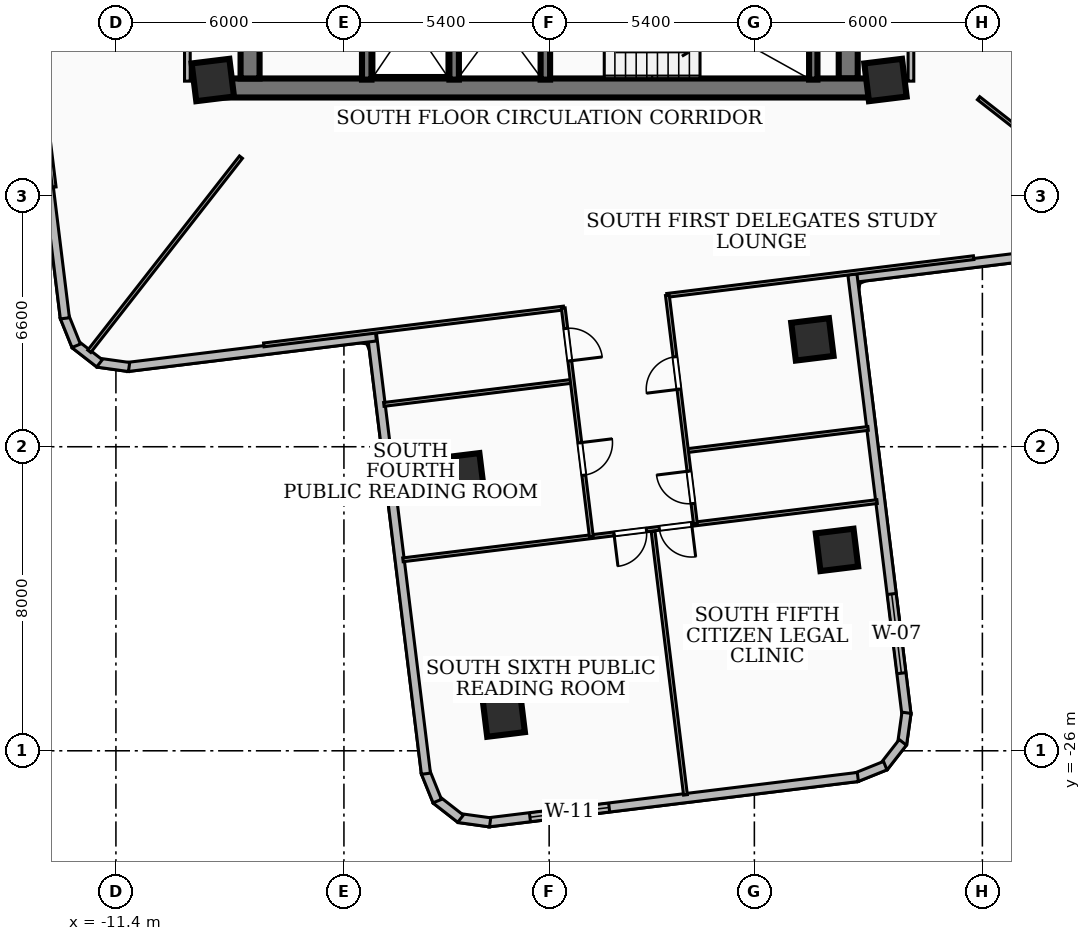
"""IFC4 building model, lengths in metres.
Left out: names, types, materials, properties, quantities, classifications, styles, units other than length and angle.
Written with IfcOpenShell. Run it as: python <this file> out.ifc"""

import sys

from ifc_helpers import new_model, si_unit, direction, frame, frame_2d, origin, origin_2d, place, context, subcontext, project, spatial, rectangle, extrude, element, fill, save


model = new_model("IFC4")
c1 = context("Model", 3, precision=1e-05, world=origin(), true_north=direction((0.0, 1.0)))
c2 = subcontext(c1, "Body", "Model", "MODEL_VIEW")
j1 = project(units=[si_unit("LENGTHUNIT", "METRE"), si_unit("PLANEANGLEUNIT", "RADIAN")], contexts=[c1])
p1 = place(None, origin())
s1 = spatial("IfcSite", under=j1, at=p1, CompositionType="ELEMENT")
p2 = place(p1, origin())
s2 = spatial("IfcBuilding", under=s1, at=p2, CompositionType="ELEMENT")
p3 = place(p2, frame((0.0, 0.0, 82.08)))
s3 = spatial("IfcBuildingStorey", under=s2, at=p3, CompositionType="ELEMENT", Elevation=82.08)
p4 = place(p3, frame((8.78, -8.56, 0.0), z_axis=(0.0, 0.0, 1.0), x_axis=(-1.0, 0.0, 0.0)))
e1 = element("IfcWall", 1, at=p4, inside=s3, PredefinedType="SHEAR", context=c2, shape_type="SweptSolid", body=[
    extrude(rectangle(XDim=17.56, YDim=0.5, at=frame_2d((8.78, 0.0))), origin(), (0.0, 0.0, 1.0), 3.34),
])
for number, where, z_axis, x_axis in (
    (2, (-7.87, -8.31, 0.0), (0.0, 0.0, 1.0), (0.0, 1.0, 0.0)),
    (3, (7.87, -2.0, 0.0), (0.0, 0.0, 1.0), (0.0, -1.0, 0.0)),
):
    element("IfcWall", number, at=place(p3, frame(where, z_axis=z_axis, x_axis=x_axis)), inside=s3, PredefinedType="SHEAR", context=c2, shape_type="SweptSolid", body=[
        extrude(rectangle(XDim=6.31, YDim=0.5, at=frame_2d((3.155, 0.0))), origin(), (0.0, 0.0, 1.0), 3.34),
    ])
p5 = place(p3, frame((6.95, -8.34, 0.0), z_axis=(0.0, 0.0, 1.0), x_axis=(0.0, 1.0, 0.0)))
e4 = element("IfcWall", 4, at=p5, inside=s3, PredefinedType="SOLIDWALL", context=c2, shape_type="SweptSolid", body=[
    extrude(rectangle(XDim=3.06, YDim=0.22, at=frame_2d((1.53, 0.0))), origin(), (0.0, 0.0, 1.0), 3.34),
])
for number, where, z_axis, x_axis in (
    (5, (-0.1, -8.34, 0.0), (0.0, 0.0, 1.0), (0.0, 1.0, 0.0)),
    (6, (-2.5, -8.34, 0.0), (0.0, 0.0, 1.0), (0.0, 1.0, 0.0)),
    (7, (-4.8, -8.34, 0.0), (0.0, 0.0, 1.0), (0.0, 1.0, 0.0)),
):
    element("IfcWall", number, at=place(p3, frame(where, z_axis=z_axis, x_axis=x_axis)), inside=s3, PredefinedType="SOLIDWALL", context=c2, shape_type="SweptSolid", body=[
        extrude(rectangle(XDim=3.04, YDim=0.25, at=frame_2d((1.52, 0.0))), origin(), (0.0, 0.0, 1.0), 3.34),
    ])
for number, where, z_axis, x_axis in (
    (8, (8.85, -8.35, 0.0), (0.0, 0.0, 1.0), (0.993, 0.122, 0.0)),
    (9, (-8.85, -8.35, 0.0), (0.0, 0.0, 1.0), (0.993, 0.122, 0.0)),
    (10, (-2.271, -18.724, 0.0), (0.0, 0.0, 1.0), (0.993, 0.122, 0.0)),
    (11, (6.927, -15.175, 0.0), (0.0, 0.0, 1.0), (0.993, 0.122, 0.0)),
    (12, (-1.195, -25.074, 0.0), (0.0, 0.0, 1.0), (0.993, 0.122, 0.0)),
    (13, (7.574, -20.714, 0.0), (0.0, 0.0, 1.0), (0.993, 0.122, 0.0)),
):
    element("IfcColumn", number, at=place(p3, frame(where, z_axis=z_axis, x_axis=x_axis)), inside=s3, PredefinedType="COLUMN", context=c2, shape_type="SweptSolid", body=[
        extrude(rectangle(XDim=1.0, YDim=1.0, at=origin_2d()), origin(), (0.0, 0.0, 1.0), 3.6),
    ])
p6 = place(p3, frame((14.621, -12.743, 0.0), z_axis=(0.0, 0.0, 1.0), x_axis=(-0.992536263595, -0.121949848087, 0.0)))
e14 = element("IfcWall", 14, at=p6, inside=s3, PredefinedType="SOLIDWALL", context=c2, shape_type="SweptSolid", body=[
    extrude(rectangle(XDim=6.775, YDim=0.24, at=frame_2d((3.387, 0.0))), origin(), (0.0, 0.0, 1.0), 3.34),
])
p7 = place(p3, frame((7.98, -13.462, 0.0), z_axis=(0.0, 0.0, 1.0), x_axis=(0.121890578705, -0.992543544044, 0.0)))
e15 = element("IfcWall", 15, at=p7, inside=s3, PredefinedType="SOLIDWALL", context=c2, shape_type="SweptSolid", body=[
    extrude(rectangle(XDim=11.675, YDim=0.24, at=frame_2d((5.838, 0.0))), origin(), (0.0, 0.0, 1.0), 3.34),
])
p8 = place(p7, frame((8.475, 0.0, 0.85)))
e16 = element("IfcOpeningElement", 16, at=p8, cuts=e15, PredefinedType="OPENING", context=c2, shape_type="SweptSolid", body=[
    extrude(rectangle(XDim=2.1, YDim=1.8, at=frame_2d((1.05, 0.9))), frame((0.0, 0.13, 0.0), z_axis=(0.0, -1.0, 0.0), x_axis=(1.0, 0.0, 0.0)), (0.0, 0.0, 1.0), 0.26),
])
p9 = place(p3, frame((9.403, -25.0, 0.0), z_axis=(0.0, 0.0, 1.0), x_axis=(-0.138376981782, -0.990379629694, 0.0)))
e17 = element("IfcWall", 17, at=p9, inside=s3, PredefinedType="SOLIDWALL", context=c2, shape_type="SweptSolid", body=[
    extrude(rectangle(XDim=0.831, YDim=0.24, at=frame_2d((0.416, 0.0))), origin(), (0.0, 0.0, 1.0), 3.34),
])
p10 = place(p3, frame((9.306, -25.778, 0.0), z_axis=(0.0, 0.0, 1.0), x_axis=(-0.614542882467, -0.788883416995, 0.0)))
e18 = element("IfcWall", 18, at=p10, inside=s3, PredefinedType="SOLIDWALL", context=c2, shape_type="SweptSolid", body=[
    extrude(rectangle(XDim=0.814, YDim=0.24, at=frame_2d((0.407, 0.0))), origin(), (0.0, 0.0, 1.0), 3.34),
])
p11 = place(p3, frame((8.844, -26.391, 0.0), z_axis=(0.0, 0.0, 1.0), x_axis=(-0.92756002783, -0.37367418264, 0.0)))
e19 = element("IfcWall", 19, at=p11, inside=s3, PredefinedType="SOLIDWALL", context=c2, shape_type="SweptSolid", body=[
    extrude(rectangle(XDim=0.829, YDim=0.24, at=frame_2d((0.415, 0.0))), origin(), (0.0, 0.0, 1.0), 3.34),
])
p12 = place(p3, frame((8.123, -26.689, 0.0), z_axis=(0.0, 0.0, 1.0), x_axis=(-0.992547632308, -0.12185728374, 0.0)))
e20 = element("IfcWall", 20, at=p12, inside=s3, PredefinedType="SOLIDWALL", context=c2, shape_type="SweptSolid", body=[
    extrude(rectangle(XDim=9.799, YDim=0.24, at=frame_2d((4.899, 0.0))), origin(), (0.0, 0.0, 1.0), 3.34),
])
p13 = place(p12, frame((6.593, 0.0, 0.85)))
e21 = element("IfcOpeningElement", 21, at=p13, cuts=e20, PredefinedType="OPENING", context=c2, shape_type="SweptSolid", body=[
    extrude(rectangle(XDim=2.1, YDim=1.6, at=frame_2d((1.05, 0.8))), frame((0.0, 0.13, 0.0), z_axis=(0.0, -1.0, 0.0), x_axis=(1.0, 0.0, 0.0)), (0.0, 0.0, 1.0), 0.26),
])
p14 = place(p3, frame((-1.553, -27.883, 0.0), z_axis=(0.0, 0.0, 1.0), x_axis=(-0.990540037659, 0.137224027762, 0.0)))
e22 = element("IfcWall", 22, at=p14, inside=s3, PredefinedType="SOLIDWALL", context=c2, shape_type="SweptSolid", body=[
    extrude(rectangle(XDim=0.831, YDim=0.24, at=frame_2d((0.416, 0.0))), origin(), (0.0, 0.0, 1.0), 3.34),
])
p15 = place(p3, frame((-2.331, -27.787, 0.0), z_axis=(0.0, 0.0, 1.0), x_axis=(-0.788156162836, 0.615475314683, 0.0)))
e23 = element("IfcWall", 23, at=p15, inside=s3, PredefinedType="SOLIDWALL", context=c2, shape_type="SweptSolid", body=[
    extrude(rectangle(XDim=0.814, YDim=0.24, at=frame_2d((0.407, 0.0))), origin(), (0.0, 0.0, 1.0), 3.34),
])
p16 = place(p3, frame((-2.944, -27.324, 0.0), z_axis=(0.0, 0.0, 1.0), x_axis=(-0.37367418264, 0.92756002783, 0.0)))
e24 = element("IfcWall", 24, at=p16, inside=s3, PredefinedType="SOLIDWALL", context=c2, shape_type="SweptSolid", body=[
    extrude(rectangle(XDim=0.829, YDim=0.24, at=frame_2d((0.415, 0.0))), origin(), (0.0, 0.0, 1.0), 3.34),
])
p17 = place(p3, frame((-3.242, -26.603, 0.0), z_axis=(0.0, 0.0, 1.0), x_axis=(-0.121890578705, 0.992543544044, 0.0)))
e25 = element("IfcWall", 25, at=p17, inside=s3, PredefinedType="SOLIDWALL", context=c2, shape_type="SweptSolid", body=[
    extrude(rectangle(XDim=11.675, YDim=0.24, at=frame_2d((5.838, 0.0))), origin(), (0.0, 0.0, 1.0), 2.486),
])
p18 = place(p3, frame((-4.558, -15.098, 0.0), z_axis=(0.0, 0.0, 1.0), x_axis=(-0.992537639855, -0.121938646341, 0.0)))
e26 = element("IfcWall", 26, at=p18, inside=s3, PredefinedType="SOLIDWALL", context=c2, shape_type="SweptSolid", body=[
    extrude(rectangle(XDim=6.595, YDim=0.24, at=frame_2d((3.298, 0.0))), origin(), (0.0, 0.0, 1.0), 2.486),
])
p19 = place(p3, frame((-11.054, -15.902, 0.0), z_axis=(0.0, 0.0, 1.0), x_axis=(-0.990379629694, 0.138376981782, 0.0)))
e27 = element("IfcWall", 27, at=p19, inside=s3, PredefinedType="SOLIDWALL", context=c2, shape_type="SweptSolid", body=[
    extrude(rectangle(XDim=0.831, YDim=0.24, at=frame_2d((0.416, 0.0))), origin(), (0.0, 0.0, 1.0), 3.34),
])
p20 = place(p3, frame((-11.832, -15.805, 0.0), z_axis=(0.0, 0.0, 1.0), x_axis=(-0.788996702001, 0.614397431824, 0.0)))
e28 = element("IfcWall", 28, at=p20, inside=s3, PredefinedType="SOLIDWALL", context=c2, shape_type="SweptSolid", body=[
    extrude(rectangle(XDim=0.814, YDim=0.24, at=frame_2d((0.407, 0.0))), origin(), (0.0, 0.0, 1.0), 3.34),
])
p21 = place(p3, frame((-12.445, -15.343, 0.0), z_axis=(0.0, 0.0, 1.0), x_axis=(-0.37326634174, 0.927724225254, 0.0)))
e29 = element("IfcWall", 29, at=p21, inside=s3, PredefinedType="SOLIDWALL", context=c2, shape_type="SweptSolid", body=[
    extrude(rectangle(XDim=0.83, YDim=0.24, at=frame_2d((0.415, 0.0))), origin(), (0.0, 0.0, 1.0), 3.34),
])
p22 = place(p3, frame((-12.743, -14.621, 0.0), z_axis=(0.0, 0.0, 1.0), x_axis=(-0.121949848087, 0.992536263595, 0.0)))
e30 = element("IfcWall", 30, at=p22, inside=s3, PredefinedType="SOLIDWALL", context=c2, shape_type="SweptSolid", body=[
    extrude(rectangle(XDim=6.775, YDim=0.24, at=frame_2d((3.387, 0.0))), origin(), (0.0, 0.0, 1.0), 3.34),
])
for number, where, z_axis, x_axis in (
    (31, (-9.52, -8.38, 0.0), (0.0, 0.0, 1.0), (0.0, 1.0, 0.0)),
    (32, (9.52, -8.38, 0.0), (0.0, 0.0, 1.0), (0.0, 1.0, 0.0)),
):
    element("IfcWall", number, at=place(p3, frame(where, z_axis=z_axis, x_axis=x_axis)), inside=s3, PredefinedType="PARTITIONING", context=c2, shape_type="SweptSolid", body=[
        extrude(rectangle(XDim=6.63, YDim=0.15, at=frame_2d((3.315, 0.0))), origin(), (0.0, 0.0, 1.0), 2.486),
    ])
p23 = place(p3, frame((-8.11, -10.38, 0.0), z_axis=(0.0, 0.0, 1.0), x_axis=(-0.615665236773, -0.788007814828, 0.0)))
e33 = element("IfcWall", 33, at=p23, inside=s3, PredefinedType="PARTITIONING", context=c2, shape_type="SweptSolid", body=[
    extrude(rectangle(XDim=6.482, YDim=0.1, at=frame_2d((3.241, 0.0))), origin(), (0.0, 0.0, 1.0), 3.34),
])
p24 = place(p3, frame((11.3, -8.829, 0.0), z_axis=(0.0, 0.0, 1.0), x_axis=(0.788014623364, -0.61565652223, 0.0)))
e34 = element("IfcWall", 34, at=p24, inside=s3, PredefinedType="PARTITIONING", context=c2, shape_type="SweptSolid", body=[
    extrude(rectangle(XDim=5.315, YDim=0.1, at=frame_2d((2.657, 0.0))), origin(), (0.0, 0.0, 1.0), 3.34),
])
for number, where, z_axis, x_axis in (
    (35, (-14.017, -3.101, 0.0), (0.0, 0.0, 1.0), (0.122, -0.993, 0.0)),
    (36, (3.101, -14.017, 0.0), (0.0, 0.0, 1.0), (0.993, 0.122, 0.0)),
):
    element("IfcWall", number, at=place(p3, frame(where, z_axis=z_axis, x_axis=x_axis)), inside=s3, PredefinedType="PARTITIONING", context=c2, shape_type="SweptSolid", body=[
        extrude(rectangle(XDim=8.13, YDim=0.1, at=frame_2d((4.065, 0.0))), origin(), (0.0, 0.0, 1.0), 2.486),
    ])
p25 = place(p3, frame((-7.509, -15.32, 0.0), z_axis=(0.0, 0.0, 1.0), x_axis=(0.992529957607, 0.122001160868, 0.0)))
e37 = element("IfcWall", 37, at=p25, inside=s3, PredefinedType="PARTITIONING", context=c2, shape_type="SweptSolid", body=[
    extrude(rectangle(XDim=7.95, YDim=0.1, at=frame_2d((3.975, 0.0))), origin(), (0.0, 0.0, 1.0), 2.486),
])
p26 = place(p3, frame((3.633, -18.102, 0.0), z_axis=(0.0, 0.0, 1.0), x_axis=(0.992555014783, 0.121797137196, 0.0)))
e38 = element("IfcWall", 38, at=p26, inside=s3, PredefinedType="PARTITIONING", context=c2, shape_type="SweptSolid", body=[
    extrude(rectangle(XDim=4.795, YDim=0.1, at=frame_2d((2.397, 0.0))), origin(), (0.0, 0.0, 1.0), 2.486),
])
p27 = place(p3, frame((-4.35, -16.886, 0.0), z_axis=(0.0, 0.0, 1.0), x_axis=(0.992554700093, 0.121799701653, 0.0)))
e39 = element("IfcWall", 39, at=p27, inside=s3, PredefinedType="PARTITIONING", context=c2, shape_type="SweptSolid", body=[
    extrude(rectangle(XDim=4.975, YDim=0.1, at=frame_2d((2.488, 0.0))), origin(), (0.0, 0.0, 1.0), 2.486),
])
p28 = place(p3, frame((3.85, -20.03, 0.0), z_axis=(0.0, 0.0, 1.0), x_axis=(-0.121942127656, 0.99253721215, 0.0)))
e40 = element("IfcWall", 40, at=p28, inside=s3, PredefinedType="PARTITIONING", context=c2, shape_type="SweptSolid", body=[
    extrude(rectangle(XDim=6.06, YDim=0.1, at=frame_2d((3.03, 0.0))), origin(), (0.0, 0.0, 1.0), 3.34),
])
p29 = place(p28, frame((3.57, 0.0, 0.0)))
e41 = element("IfcOpeningElement", 41, at=p29, cuts=e40, PredefinedType="OPENING", context=c2, shape_type="SweptSolid", body=[
    extrude(rectangle(XDim=0.86, YDim=2.04, at=frame_2d((0.43, 1.02))), frame((0.0, 0.06, 0.0), z_axis=(0.0, -1.0, 0.0), x_axis=(1.0, 0.0, 0.0)), (0.0, 0.0, 1.0), 0.12),
])
p30 = place(p28, frame((0.54, 0.0, 0.0)))
e42 = element("IfcOpeningElement", 42, at=p30, cuts=e40, PredefinedType="OPENING", context=c2, shape_type="SweptSolid", body=[
    extrude(rectangle(XDim=0.86, YDim=2.04, at=frame_2d((0.43, 1.02))), frame((0.0, 0.06, 0.0), z_axis=(0.0, -1.0, 0.0), x_axis=(1.0, 0.0, 0.0)), (0.0, 0.0, 1.0), 0.12),
])
p31 = place(p3, frame((0.372, -14.352, 0.0), z_axis=(0.0, 0.0, 1.0), x_axis=(0.121807732679, -0.992553714546, 0.0)))
e43 = element("IfcWall", 43, at=p31, inside=s3, PredefinedType="PARTITIONING", context=c2, shape_type="SweptSolid", body=[
    extrude(rectangle(XDim=6.059, YDim=0.1, at=frame_2d((3.03, 0.0))), origin(), (0.0, 0.0, 1.0), 3.34),
])
p32 = place(p31, frame((0.54, 0.0, 0.0)))
e44 = element("IfcOpeningElement", 44, at=p32, cuts=e43, PredefinedType="OPENING", context=c2, shape_type="SweptSolid", body=[
    extrude(rectangle(XDim=0.86, YDim=2.04, at=frame_2d((0.43, 1.02))), frame((0.0, 0.06, 0.0), z_axis=(0.0, -1.0, 0.0), x_axis=(1.0, 0.0, 0.0)), (0.0, 0.0, 1.0), 0.12),
])
p33 = place(p31, frame((3.57, 0.0, 0.0)))
e45 = element("IfcOpeningElement", 45, at=p33, cuts=e43, PredefinedType="OPENING", context=c2, shape_type="SweptSolid", body=[
    extrude(rectangle(XDim=0.86, YDim=2.04, at=frame_2d((0.43, 1.02))), frame((0.0, 0.06, 0.0), z_axis=(0.0, -1.0, 0.0), x_axis=(1.0, 0.0, 0.0)), (0.0, 0.0, 1.0), 0.12),
])
p34 = place(p3, frame((2.735, -20.227, 0.0), z_axis=(0.0, 0.0, 1.0), x_axis=(0.121948085338, -0.992536480177, 0.0)))
e46 = element("IfcWall", 46, at=p34, inside=s3, PredefinedType="PARTITIONING", context=c2, shape_type="SweptSolid", body=[
    extrude(rectangle(XDim=6.985, YDim=0.1, at=frame_2d((3.493, 0.0))), origin(), (0.0, 0.0, 1.0), 2.793),
])
p35 = place(p3, frame((8.629, -19.443, 0.0), z_axis=(0.0, 0.0, 1.0), x_axis=(-0.992544774441, -0.121880559277, 0.0)))
e47 = element("IfcWall", 47, at=p35, inside=s3, PredefinedType="PARTITIONING", context=c2, shape_type="SweptSolid", body=[
    extrude(rectangle(XDim=12.57, YDim=0.1, at=frame_2d((6.285, 0.0))), origin(), (0.0, 0.0, 1.0), 2.486),
])
p36 = place(p35, frame((6.115, 0.0, 0.0)))
e48 = element("IfcOpeningElement", 48, at=p36, cuts=e47, PredefinedType="OPENING", context=c2, shape_type="SweptSolid", body=[
    extrude(rectangle(XDim=0.86, YDim=2.04, at=frame_2d((0.43, 1.02))), frame((0.0, 0.06, 0.0), z_axis=(0.0, -1.0, 0.0), x_axis=(1.0, 0.0, 0.0)), (0.0, 0.0, 1.0), 0.12),
])
p37 = place(p35, frame((4.915, 0.0, 0.0)))
e49 = element("IfcOpeningElement", 49, at=p37, cuts=e47, PredefinedType="OPENING", context=c2, shape_type="SweptSolid", body=[
    extrude(rectangle(XDim=0.86, YDim=2.04, at=frame_2d((0.43, 1.02))), frame((0.0, 0.06, 0.0), z_axis=(0.0, -1.0, 0.0), x_axis=(1.0, 0.0, 0.0)), (0.0, 0.0, 1.0), 0.12),
])
p38 = place(p8, origin())
e50 = element("IfcWindow", 50, at=p38, inside=s3, PartitioningType="SINGLE_PANEL", PredefinedType="WINDOW", context=c2, shape_type="SweptSolid", body=[
    extrude(rectangle(XDim=2.1, YDim=1.8, at=frame_2d((1.05, 0.9))), frame((0.0, 0.03, 0.0), z_axis=(0.0, -1.0, 0.0), x_axis=(1.0, 0.0, 0.0)), (0.0, 0.0, 1.0), 0.06),
])
fill(e16, e50)
p39 = place(p13, origin())
e51 = element("IfcWindow", 51, at=p39, inside=s3, PartitioningType="SINGLE_PANEL", PredefinedType="WINDOW", context=c2, shape_type="SweptSolid", body=[
    extrude(rectangle(XDim=2.1, YDim=1.6, at=frame_2d((1.05, 0.8))), frame((0.0, 0.03, 0.0), z_axis=(0.0, -1.0, 0.0), x_axis=(1.0, 0.0, 0.0)), (0.0, 0.0, 1.0), 0.06),
])
fill(e21, e51)
p40 = place(p29, origin())
e52 = element("IfcDoor", 52, at=p40, inside=s3, OperationType="SINGLE_SWING_LEFT", PredefinedType="DOOR", context=c2, shape_type="SweptSolid", body=[
    extrude(rectangle(XDim=0.86, YDim=2.04, at=frame_2d((0.43, 1.02))), frame((0.0, 0.025, 0.0), z_axis=(0.0, -1.0, 0.0), x_axis=(1.0, 0.0, 0.0)), (0.0, 0.0, 1.0), 0.05),
])
fill(e41, e52)
p41 = place(p30, origin())
e53 = element("IfcDoor", 53, at=p41, inside=s3, OperationType="SINGLE_SWING_RIGHT", PredefinedType="DOOR", context=c2, shape_type="SweptSolid", body=[
    extrude(rectangle(XDim=0.86, YDim=2.04, at=frame_2d((0.43, 1.02))), frame((0.0, 0.025, 0.0), z_axis=(0.0, -1.0, 0.0), x_axis=(1.0, 0.0, 0.0)), (0.0, 0.0, 1.0), 0.05),
])
fill(e42, e53)
p42 = place(p32, origin())
e54 = element("IfcDoor", 54, at=p42, inside=s3, OperationType="SINGLE_SWING_RIGHT", PredefinedType="DOOR", context=c2, shape_type="SweptSolid", body=[
    extrude(rectangle(XDim=0.86, YDim=2.04, at=frame_2d((0.43, 1.02))), frame((0.0, 0.025, 0.0), z_axis=(0.0, -1.0, 0.0), x_axis=(1.0, 0.0, 0.0)), (0.0, 0.0, 1.0), 0.05),
])
fill(e44, e54)
p43 = place(p33, origin())
e55 = element("IfcDoor", 55, at=p43, inside=s3, OperationType="SINGLE_SWING_LEFT", PredefinedType="DOOR", context=c2, shape_type="SweptSolid", body=[
    extrude(rectangle(XDim=0.86, YDim=2.04, at=frame_2d((0.43, 1.02))), frame((0.0, 0.025, 0.0), z_axis=(0.0, -1.0, 0.0), x_axis=(1.0, 0.0, 0.0)), (0.0, 0.0, 1.0), 0.05),
])
fill(e45, e55)
p44 = place(p36, origin())
e56 = element("IfcDoor", 56, at=p44, inside=s3, OperationType="SINGLE_SWING_RIGHT", PredefinedType="DOOR", context=c2, shape_type="SweptSolid", body=[
    extrude(rectangle(XDim=0.86, YDim=2.04, at=frame_2d((0.43, 1.02))), frame((0.0, 0.025, 0.0), z_axis=(0.0, -1.0, 0.0), x_axis=(1.0, 0.0, 0.0)), (0.0, 0.0, 1.0), 0.05),
])
fill(e48, e56)
p45 = place(p37, origin())
e57 = element("IfcDoor", 57, at=p45, inside=s3, OperationType="SINGLE_SWING_LEFT", PredefinedType="DOOR", context=c2, shape_type="SweptSolid", body=[
    extrude(rectangle(XDim=0.86, YDim=2.04, at=frame_2d((0.43, 1.02))), frame((0.0, 0.025, 0.0), z_axis=(0.0, -1.0, 0.0), x_axis=(1.0, 0.0, 0.0)), (0.0, 0.0, 1.0), 0.05),
])
fill(e49, e57)
save(model, sys.argv[1])
